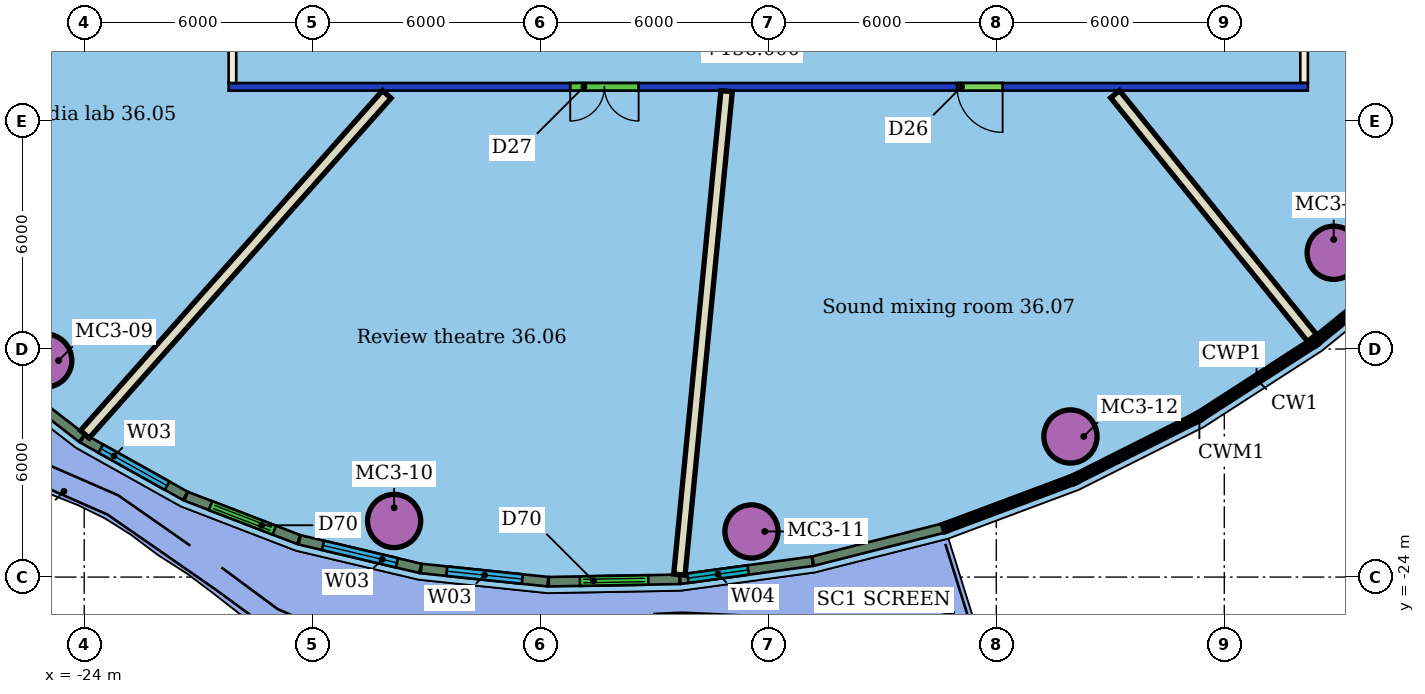
"""IFC4 building model, lengths in metres.
Left out: names, types, materials, properties, quantities, classifications, styles, units other than length and angle.
Written with IfcOpenShell. Run it as: python <this file> out.ifc"""

import sys

from ifc_helpers import new_model, si_unit, direction, frame, frame_2d, origin, origin_2d, place, context, subcontext, project, spatial, rectangle, hollow_circle, extrude, element, fill, save


model = new_model("IFC4")
c1 = context("Model", 3, precision=1e-05, world=origin(), true_north=direction((0.0, 1.0)))
c2 = subcontext(c1, "Body", "Model", "MODEL_VIEW")
j1 = project(units=[si_unit("LENGTHUNIT", "METRE"), si_unit("PLANEANGLEUNIT", "RADIAN")], contexts=[c1])
p1 = place(None, origin())
s1 = spatial("IfcSite", under=j1, at=p1, CompositionType="ELEMENT")
p2 = place(p1, origin())
s2 = spatial("IfcBuilding", under=s1, at=p2, CompositionType="ELEMENT")
p3 = place(p2, frame((0.0, 0.0, 154.2)))
s3 = spatial("IfcBuildingStorey", under=s2, at=p3, CompositionType="ELEMENT", Elevation=154.2)
for number, where, z_axis, x_axis in (
    (1, (-25.026, -18.303, 0.0), (0.0, 0.0, 1.0), (1.0, 0.0, 0.0)),
    (2, (-15.845, -22.524, 0.0), (0.0, 0.0, 1.0), (1.0, 0.0, 0.0)),
    (3, (-6.442, -22.8, 0.0), (0.0, 0.0, 1.0), (1.0, 0.0, 0.0)),
    (4, (1.952, -20.301, 0.0), (0.0, 0.0, 1.0), (1.0, 0.0, 0.0)),
    (5, (8.879, -15.467, 0.0), (0.0, 0.0, 1.0), (1.0, 0.0, 0.0)),
):
    element("IfcColumn", number, at=place(p3, frame(where, z_axis=z_axis, x_axis=x_axis)), inside=s3, PredefinedType="COLUMN", context=c2, shape_type="SweptSolid", body=[
        extrude(hollow_circle(Radius=0.7, WallThickness=0.05, at=origin_2d()), origin(), (0.0, 0.0, 1.0), 3.45),
    ])
p4 = place(p3, frame((8.2, -11.1, 0.0), z_axis=(0.0, 0.0, 1.0), x_axis=(-1.0, 0.0, 0.0)))
e6 = element("IfcWall", 6, at=p4, inside=s3, PredefinedType="PARTITIONING", context=c2, shape_type="SweptSolid", body=[
    extrude(rectangle(XDim=28.4, YDim=0.2, at=frame_2d((14.2, 0.0))), origin(), (0.0, 0.0, 1.0), 3.05),
])
p5 = place(p4, frame((17.611, 0.0, 0.0)))
e7 = element("IfcOpeningElement", 7, at=p5, cuts=e6, PredefinedType="OPENING", context=c2, shape_type="SweptSolid", body=[
    extrude(rectangle(XDim=1.8, YDim=2.4, at=frame_2d((0.9, 1.2))), frame((0.0, 0.11, 0.0), z_axis=(0.0, -1.0, 0.0), x_axis=(1.0, 0.0, 0.0)), (0.0, 0.0, 1.0), 0.22),
])
p6 = place(p4, frame((8.032, 0.0, 0.0)))
e8 = element("IfcOpeningElement", 8, at=p6, cuts=e6, PredefinedType="OPENING", context=c2, shape_type="SweptSolid", body=[
    extrude(rectangle(XDim=1.2, YDim=2.1, at=frame_2d((0.6, 1.05))), frame((0.0, 0.11, 0.0), z_axis=(0.0, -1.0, 0.0), x_axis=(1.0, 0.0, 0.0)), (0.0, 0.0, 1.0), 0.22),
])
p7 = place(p3, frame((-20.1, -11.0, 0.0), z_axis=(0.0, 0.0, 1.0), x_axis=(0.0, 1.0, 0.0)))
e9 = element("IfcWall", 9, at=p7, inside=s3, PredefinedType="PARTITIONING", context=c2, shape_type="SweptSolid", body=[
    extrude(rectangle(XDim=22.0, YDim=0.2, at=frame_2d((11.0, 0.0))), origin(), (0.0, 0.0, 1.0), 3.45),
])
p8 = place(p7, frame((8.83, 0.0, 0.0)))
e10 = element("IfcOpeningElement", 10, at=p8, cuts=e9, PredefinedType="OPENING", context=c2, shape_type="SweptSolid", body=[
    extrude(rectangle(XDim=1.8, YDim=2.1, at=frame_2d((0.9, 1.05))), frame((0.0, 0.11, 0.0), z_axis=(0.0, -1.0, 0.0), x_axis=(1.0, 0.0, 0.0)), (0.0, 0.0, 1.0), 0.22),
])
p9 = place(p7, frame((3.613, 0.0, 0.0)))
e11 = element("IfcOpeningElement", 11, at=p9, cuts=e9, PredefinedType="OPENING", context=c2, shape_type="SweptSolid", body=[
    extrude(rectangle(XDim=1.0, YDim=2.1, at=frame_2d((0.5, 1.05))), frame((0.0, 0.11, 0.0), z_axis=(0.0, -1.0, 0.0), x_axis=(1.0, 0.0, 0.0)), (0.0, 0.0, 1.0), 0.22),
])
p10 = place(p3, frame((8.1, 11.0, 0.0), z_axis=(0.0, 0.0, 1.0), x_axis=(0.0, -1.0, 0.0)))
e12 = element("IfcWall", 12, at=p10, inside=s3, PredefinedType="PARTITIONING", context=c2, shape_type="SweptSolid", body=[
    extrude(rectangle(XDim=22.0, YDim=0.2, at=frame_2d((11.0, 0.0))), origin(), (0.0, 0.0, 1.0), 3.45),
])
p11 = place(p10, frame((13.221, 0.0, 0.0)))
e13 = element("IfcOpeningElement", 13, at=p11, cuts=e12, PredefinedType="OPENING", context=c2, shape_type="SweptSolid", body=[
    extrude(rectangle(XDim=1.8, YDim=2.1, at=frame_2d((0.9, 1.05))), frame((0.0, 0.11, 0.0), z_axis=(0.0, -1.0, 0.0), x_axis=(1.0, 0.0, 0.0)), (0.0, 0.0, 1.0), 0.22),
])
p12 = place(p10, frame((5.411, 0.0, 0.0)))
e14 = element("IfcOpeningElement", 14, at=p12, cuts=e12, PredefinedType="OPENING", context=c2, shape_type="SweptSolid", body=[
    extrude(rectangle(XDim=1.8, YDim=2.1, at=frame_2d((0.9, 1.05))), frame((0.0, 0.11, 0.0), z_axis=(0.0, -1.0, 0.0), x_axis=(1.0, 0.0, 0.0)), (0.0, 0.0, 1.0), 0.22),
])
p13 = place(p3, frame((-23.983, -20.243, 0.0), z_axis=(0.0, 0.0, 1.0), x_axis=(0.664148461509, 0.747600709654, 0.0)))
e15 = element("IfcWall", 15, at=p13, inside=s3, PredefinedType="PARTITIONING", context=c2, shape_type="SweptSolid", body=[
    extrude(rectangle(XDim=11.962, YDim=0.3, at=frame_2d((5.981, 0.0))), origin(), (0.0, 0.0, 1.0), 3.45),
])
p14 = place(p3, frame((-8.338, -23.934, 0.0), z_axis=(0.0, 0.0, 1.0), x_axis=(0.097233807597, 0.995261566956, 0.0)))
e16 = element("IfcWall", 16, at=p14, inside=s3, PredefinedType="PARTITIONING", context=c2, shape_type="SweptSolid", body=[
    extrude(rectangle(XDim=12.78, YDim=0.3, at=frame_2d((6.39, 0.0))), origin(), (0.0, 0.0, 1.0), 3.45),
])
p15 = place(p3, frame((8.31, -17.708, 0.0), z_axis=(0.0, 0.0, 1.0), x_axis=(-0.628547282079, 0.777771376557, 0.0)))
e17 = element("IfcWall", 17, at=p15, inside=s3, PredefinedType="PARTITIONING", context=c2, shape_type="SweptSolid", body=[
    extrude(rectangle(XDim=8.246, YDim=0.3, at=frame_2d((4.123, 0.0))), origin(), (0.0, 0.0, 1.0), 3.45),
])
p16 = place(p3, frame((-26.421, -18.513, 0.0), z_axis=(0.0, 0.0, 1.0), x_axis=(0.790822117726, -0.612046058818, 0.0)))
e18 = element("IfcWall", 18, at=p16, inside=s3, PredefinedType="SOLIDWALL", context=c2, shape_type="SweptSolid", body=[
    extrude(rectangle(XDim=2.982, YDim=0.25, at=frame_2d((1.491, 0.0))), origin(), (0.0, 0.0, 1.0), 3.1),
])
p17 = place(p3, frame((-24.041, -20.354, 0.0), z_axis=(0.0, 0.0, 1.0), x_axis=(0.872921725824, -0.487860287976, 0.0)))
e19 = element("IfcWall", 19, at=p17, inside=s3, PredefinedType="SOLIDWALL", context=c2, shape_type="SweptSolid", body=[
    extrude(rectangle(XDim=3.092, YDim=0.25, at=frame_2d((1.546, 0.0))), origin(), (0.0, 0.0, 1.0), 3.1),
])
p18 = place(p17, frame((0.546, 0.0, 0.9)))
e20 = element("IfcOpeningElement", 20, at=p18, cuts=e19, PredefinedType="OPENING", context=c2, shape_type="SweptSolid", body=[
    extrude(rectangle(XDim=2.0, YDim=2.1, at=frame_2d((1.0, 1.05))), frame((0.0, 0.135, 0.0), z_axis=(0.0, -1.0, 0.0), x_axis=(1.0, 0.0, 0.0)), (0.0, 0.0, 1.0), 0.27),
])
p19 = place(p3, frame((-21.318, -21.873, 0.0), z_axis=(0.0, 0.0, 1.0), x_axis=(0.933292072191, -0.359118236777, 0.0)))
e21 = element("IfcWall", 21, at=p19, inside=s3, PredefinedType="SOLIDWALL", context=c2, shape_type="SweptSolid", body=[
    extrude(rectangle(XDim=3.174, YDim=0.25, at=frame_2d((1.587, 0.0))), origin(), (0.0, 0.0, 1.0), 3.1),
])
p20 = place(p19, frame((0.687, 0.0, 0.0)))
e22 = element("IfcOpeningElement", 22, at=p20, cuts=e21, PredefinedType="OPENING", context=c2, shape_type="SweptSolid", body=[
    extrude(rectangle(XDim=1.8, YDim=2.4, at=frame_2d((0.9, 1.2))), frame((0.0, 0.135, 0.0), z_axis=(0.0, -1.0, 0.0), x_axis=(1.0, 0.0, 0.0)), (0.0, 0.0, 1.0), 0.27),
])
p21 = place(p3, frame((-18.332, -23.02, 0.0), z_axis=(0.0, 0.0, 1.0), x_axis=(0.973203796477, -0.229944276993, 0.0)))
e23 = element("IfcWall", 23, at=p21, inside=s3, PredefinedType="SOLIDWALL", context=c2, shape_type="SweptSolid", body=[
    extrude(rectangle(XDim=3.263, YDim=0.25, at=frame_2d((1.631, 0.0))), origin(), (0.0, 0.0, 1.0), 3.1),
])
p22 = place(p21, frame((0.631, 0.0, 0.9)))
e24 = element("IfcOpeningElement", 24, at=p22, cuts=e23, PredefinedType="OPENING", context=c2, shape_type="SweptSolid", body=[
    extrude(rectangle(XDim=2.0, YDim=2.1, at=frame_2d((1.0, 1.05))), frame((0.0, 0.135, 0.0), z_axis=(0.0, -1.0, 0.0), x_axis=(1.0, 0.0, 0.0)), (0.0, 0.0, 1.0), 0.27),
])
p23 = place(p3, frame((-15.133, -23.775, 0.0), z_axis=(0.0, 0.0, 1.0), x_axis=(0.994629661269, -0.103498004442, 0.0)))
e25 = element("IfcWall", 25, at=p23, inside=s3, PredefinedType="SOLIDWALL", context=c2, shape_type="SweptSolid", body=[
    extrude(rectangle(XDim=3.352, YDim=0.25, at=frame_2d((1.676, 0.0))), origin(), (0.0, 0.0, 1.0), 3.1),
])
p24 = place(p23, frame((0.676, 0.0, 0.9)))
e26 = element("IfcOpeningElement", 26, at=p24, cuts=e25, PredefinedType="OPENING", context=c2, shape_type="SweptSolid", body=[
    extrude(rectangle(XDim=2.0, YDim=2.1, at=frame_2d((1.0, 1.05))), frame((0.0, 0.135, 0.0), z_axis=(0.0, -1.0, 0.0), x_axis=(1.0, 0.0, 0.0)), (0.0, 0.0, 1.0), 0.27),
])
p25 = place(p3, frame((-11.775, -24.123, 0.0), z_axis=(0.0, 0.0, 1.0), x_axis=(0.999829330631, 0.018474566553, 0.0)))
e27 = element("IfcWall", 27, at=p25, inside=s3, PredefinedType="SOLIDWALL", context=c2, shape_type="SweptSolid", body=[
    extrude(rectangle(XDim=3.436, YDim=0.25, at=frame_2d((1.718, 0.0))), origin(), (0.0, 0.0, 1.0), 3.1),
])
p26 = place(p25, frame((0.818, 0.0, 0.0)))
e28 = element("IfcOpeningElement", 28, at=p26, cuts=e27, PredefinedType="OPENING", context=c2, shape_type="SweptSolid", body=[
    extrude(rectangle(XDim=1.8, YDim=2.4, at=frame_2d((0.9, 1.2))), frame((0.0, 0.135, 0.0), z_axis=(0.0, -1.0, 0.0), x_axis=(1.0, 0.0, 0.0)), (0.0, 0.0, 1.0), 0.27),
])
p27 = place(p3, frame((-8.318, -24.057, 0.0), z_axis=(0.0, 0.0, 1.0), x_axis=(0.990850899639, 0.134961085818, 0.0)))
e29 = element("IfcWall", 29, at=p27, inside=s3, PredefinedType="SOLIDWALL", context=c2, shape_type="SweptSolid", body=[
    extrude(rectangle(XDim=3.51, YDim=0.25, at=frame_2d((1.755, 0.0))), origin(), (0.0, 0.0, 1.0), 3.1),
])
p28 = place(p27, frame((0.205, 0.0, 0.9)))
e30 = element("IfcOpeningElement", 30, at=p28, cuts=e29, PredefinedType="OPENING", context=c2, shape_type="SweptSolid", body=[
    extrude(rectangle(XDim=1.6, YDim=2.1, at=frame_2d((0.8, 1.05))), frame((0.0, 0.135, 0.0), z_axis=(0.0, -1.0, 0.0), x_axis=(1.0, 0.0, 0.0)), (0.0, 0.0, 1.0), 0.27),
])
p29 = place(p3, frame((-4.819, -23.58, 0.0), z_axis=(0.0, 0.0, 1.0), x_axis=(0.969375678266, 0.245582561242, 0.0)))
e31 = element("IfcWall", 31, at=p29, inside=s3, PredefinedType="SOLIDWALL", context=c2, shape_type="SweptSolid", body=[
    extrude(rectangle(XDim=3.524, YDim=0.25, at=frame_2d((1.762, 0.0))), origin(), (0.0, 0.0, 1.0), 3.1),
])
p30 = place(p5, origin())
e32 = element("IfcDoor", 32, at=p30, inside=s3, OperationType="DOUBLE_DOOR_SINGLE_SWING", PredefinedType="DOOR", context=c2, shape_type="SweptSolid", body=[
    extrude(rectangle(XDim=1.8, YDim=2.4, at=frame_2d((0.9, 1.2))), frame((0.0, 0.025, 0.0), z_axis=(0.0, -1.0, 0.0), x_axis=(1.0, 0.0, 0.0)), (0.0, 0.0, 1.0), 0.05),
])
fill(e7, e32)
p31 = place(p6, origin())
e33 = element("IfcDoor", 33, at=p31, inside=s3, OperationType="SINGLE_SWING_LEFT", PredefinedType="DOOR", context=c2, shape_type="SweptSolid", body=[
    extrude(rectangle(XDim=1.2, YDim=2.1, at=frame_2d((0.6, 1.05))), frame((0.0, 0.025, 0.0), z_axis=(0.0, -1.0, 0.0), x_axis=(1.0, 0.0, 0.0)), (0.0, 0.0, 1.0), 0.05),
])
fill(e8, e33)
p32 = place(p18, origin())
e34 = element("IfcWindow", 34, at=p32, inside=s3, PartitioningType="SINGLE_PANEL", PredefinedType="WINDOW", context=c2, shape_type="SweptSolid", body=[
    extrude(rectangle(XDim=2.0, YDim=2.1, at=frame_2d((1.0, 1.05))), frame((0.0, 0.03, 0.0), z_axis=(0.0, -1.0, 0.0), x_axis=(1.0, 0.0, 0.0)), (0.0, 0.0, 1.0), 0.06),
])
fill(e20, e34)
p33 = place(p20, origin())
e35 = element("IfcDoor", 35, at=p33, inside=s3, OperationType="DOUBLE_DOOR_SLIDING", PredefinedType="DOOR", context=c2, shape_type="SweptSolid", body=[
    extrude(rectangle(XDim=1.8, YDim=2.4, at=frame_2d((0.9, 1.2))), frame((0.0, 0.025, 0.0), z_axis=(0.0, -1.0, 0.0), x_axis=(1.0, 0.0, 0.0)), (0.0, 0.0, 1.0), 0.05),
])
fill(e22, e35)
p34 = place(p22, origin())
e36 = element("IfcWindow", 36, at=p34, inside=s3, PartitioningType="SINGLE_PANEL", PredefinedType="WINDOW", context=c2, shape_type="SweptSolid", body=[
    extrude(rectangle(XDim=2.0, YDim=2.1, at=frame_2d((1.0, 1.05))), frame((0.0, 0.03, 0.0), z_axis=(0.0, -1.0, 0.0), x_axis=(1.0, 0.0, 0.0)), (0.0, 0.0, 1.0), 0.06),
])
fill(e24, e36)
p35 = place(p24, origin())
e37 = element("IfcWindow", 37, at=p35, inside=s3, PartitioningType="SINGLE_PANEL", PredefinedType="WINDOW", context=c2, shape_type="SweptSolid", body=[
    extrude(rectangle(XDim=2.0, YDim=2.1, at=frame_2d((1.0, 1.05))), frame((0.0, 0.03, 0.0), z_axis=(0.0, -1.0, 0.0), x_axis=(1.0, 0.0, 0.0)), (0.0, 0.0, 1.0), 0.06),
])
fill(e26, e37)
p36 = place(p26, origin())
e38 = element("IfcDoor", 38, at=p36, inside=s3, OperationType="DOUBLE_DOOR_SLIDING", PredefinedType="DOOR", context=c2, shape_type="SweptSolid", body=[
    extrude(rectangle(XDim=1.8, YDim=2.4, at=frame_2d((0.9, 1.2))), frame((0.0, 0.025, 0.0), z_axis=(0.0, -1.0, 0.0), x_axis=(1.0, 0.0, 0.0)), (0.0, 0.0, 1.0), 0.05),
])
fill(e28, e38)
p37 = place(p28, origin())
e39 = element("IfcWindow", 39, at=p37, inside=s3, PartitioningType="SINGLE_PANEL", PredefinedType="WINDOW", context=c2, shape_type="SweptSolid", body=[
    extrude(rectangle(XDim=1.6, YDim=2.1, at=frame_2d((0.8, 1.05))), frame((0.0, 0.03, 0.0), z_axis=(0.0, -1.0, 0.0), x_axis=(1.0, 0.0, 0.0)), (0.0, 0.0, 1.0), 0.06),
])
fill(e30, e39)
save(model, sys.argv[1])
